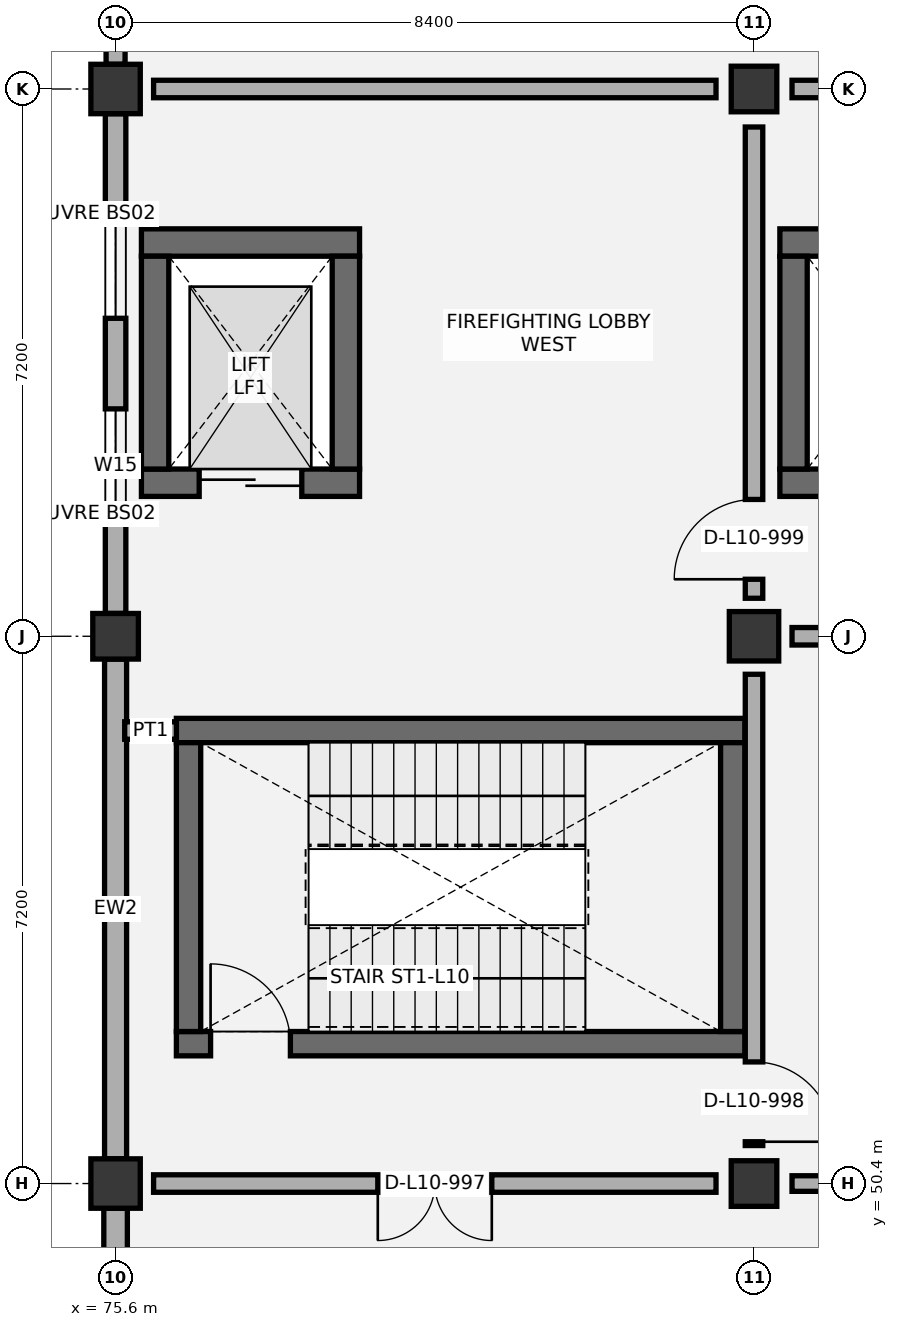
"""IFC4 building model, lengths in metres.
Left out: names, types, materials, properties, quantities, classifications, styles, units other than length and angle.
Written with IfcOpenShell. Run it as: python <this file> out.ifc"""

import sys

from ifc_helpers import new_model, si_unit, direction, frame, frame_2d, origin, origin_2d, place, context, subcontext, project, spatial, rectangle, extrude, element, fill, save


model = new_model("IFC4")
c1 = context("Model", 3, precision=1e-05, world=origin(), true_north=direction((0.0, 1.0)))
c2 = subcontext(c1, "Body", "Model", "MODEL_VIEW")
j1 = project(units=[si_unit("LENGTHUNIT", "METRE"), si_unit("PLANEANGLEUNIT", "RADIAN")], contexts=[c1])
p1 = place(None, origin())
s1 = spatial("IfcSite", under=j1, at=p1, CompositionType="ELEMENT")
p2 = place(p1, origin())
s2 = spatial("IfcBuilding", under=s1, at=p2, CompositionType="ELEMENT")
p3 = place(p2, frame((0.0, 0.0, 48.0)))
s3 = spatial("IfcBuildingStorey", under=s2, at=p3, CompositionType="ELEMENT", Elevation=48.0)
p4 = place(p3, frame((75.6, 50.4, 0.0), z_axis=(0.0, 0.0, 1.0), x_axis=(1.0, 0.0, 0.0)))
e1 = element("IfcColumn", 1, at=p4, inside=s3, PredefinedType="COLUMN", context=c2, shape_type="SweptSolid", body=[
    extrude(rectangle(XDim=0.65, YDim=0.65, at=origin_2d()), origin(), (0.0, 0.0, 1.0), 4.2),
])
p5 = place(p3, frame((75.6, 57.6, 0.0), z_axis=(0.0, 0.0, 1.0), x_axis=(1.0, 0.0, 0.0)))
e2 = element("IfcColumn", 2, at=p5, inside=s3, PredefinedType="COLUMN", context=c2, shape_type="SweptSolid", body=[
    extrude(rectangle(XDim=0.6, YDim=0.6, at=origin_2d()), origin(), (0.0, 0.0, 1.0), 4.2),
])
p6 = place(p3, frame((75.6, 64.8, 0.0), z_axis=(0.0, 0.0, 1.0), x_axis=(1.0, 0.0, 0.0)))
e3 = element("IfcColumn", 3, at=p6, inside=s3, PredefinedType="COLUMN", context=c2, shape_type="SweptSolid", body=[
    extrude(rectangle(XDim=0.65, YDim=0.65, at=origin_2d()), origin(), (0.0, 0.0, 1.0), 4.2),
])
p7 = place(p3, frame((84.0, 50.4, 0.0), z_axis=(0.0, 0.0, 1.0), x_axis=(1.0, 0.0, 0.0)))
e4 = element("IfcColumn", 4, at=p7, inside=s3, PredefinedType="COLUMN", context=c2, shape_type="SweptSolid", body=[
    extrude(rectangle(XDim=0.6, YDim=0.6, at=origin_2d()), origin(), (0.0, 0.0, 1.0), 4.2),
])
p8 = place(p3, frame((84.0, 57.6, 0.0), z_axis=(0.0, 0.0, 1.0), x_axis=(1.0, 0.0, 0.0)))
e5 = element("IfcColumn", 5, at=p8, inside=s3, PredefinedType="COLUMN", context=c2, shape_type="SweptSolid", body=[
    extrude(rectangle(XDim=0.65, YDim=0.65, at=origin_2d()), origin(), (0.0, 0.0, 1.0), 4.2),
])
p9 = place(p3, frame((84.0, 64.8, 0.0), z_axis=(0.0, 0.0, 1.0), x_axis=(1.0, 0.0, 0.0)))
e6 = element("IfcColumn", 6, at=p9, inside=s3, PredefinedType="COLUMN", context=c2, shape_type="SweptSolid", body=[
    extrude(rectangle(XDim=0.6, YDim=0.6, at=origin_2d()), origin(), (0.0, 0.0, 1.0), 4.2),
])
p10 = place(p3, frame((76.4, 52.24, 0.0), z_axis=(0.0, 0.0, 1.0), x_axis=(1.0, 0.0, 0.0)))
e7 = element("IfcWall", 7, at=p10, inside=s3, PredefinedType="SHEAR", context=c2, shape_type="SweptSolid", body=[
    extrude(rectangle(XDim=7.48, YDim=0.32, at=frame_2d((3.74, 0.0))), origin(), (0.0, 0.0, 1.0), 3.92),
])
p11 = place(p10, frame((0.45, 0.0, 0.0)))
e8 = element("IfcOpeningElement", 8, at=p11, cuts=e7, PredefinedType="OPENING", context=c2, shape_type="SweptSolid", body=[
    extrude(rectangle(XDim=1.05, YDim=2.15, at=frame_2d((0.525, 1.075))), frame((0.0, 0.17, 0.0), z_axis=(0.0, -1.0, 0.0), x_axis=(1.0, 0.0, 0.0)), (0.0, 0.0, 1.0), 0.34),
])
p12 = place(p3, frame((76.4, 56.36, 0.0), z_axis=(0.0, 0.0, 1.0), x_axis=(1.0, 0.0, 0.0)))
e9 = element("IfcWall", 9, at=p12, inside=s3, PredefinedType="SHEAR", context=c2, shape_type="SweptSolid", body=[
    extrude(rectangle(XDim=7.48, YDim=0.32, at=frame_2d((3.74, 0.0))), origin(), (0.0, 0.0, 1.0), 3.92),
])
for number, where, z_axis, x_axis in (
    (10, (76.56, 52.4, 0.0), (0.0, 0.0, 1.0), (0.0, 1.0, 0.0)),
    (11, (83.72, 52.4, 0.0), (0.0, 0.0, 1.0), (0.0, 1.0, 0.0)),
):
    element("IfcWall", number, at=place(p3, frame(where, z_axis=z_axis, x_axis=x_axis)), inside=s3, PredefinedType="SHEAR", context=c2, shape_type="SweptSolid", body=[
        extrude(rectangle(XDim=3.8, YDim=0.32, at=frame_2d((1.9, 0.0))), origin(), (0.0, 0.0, 1.0), 3.92),
    ])
p13 = place(p3, frame((75.94, 62.78, 0.0), z_axis=(0.0, 0.0, 1.0), x_axis=(1.0, 0.0, 0.0)))
e12 = element("IfcWall", 12, at=p13, inside=s3, PredefinedType="SHEAR", context=c2, shape_type="SweptSolid", body=[
    extrude(rectangle(XDim=2.87, YDim=0.36, at=frame_2d((1.435, 0.0))), origin(), (0.0, 0.0, 1.0), 3.92),
])
p14 = place(p3, frame((75.94, 59.62, 0.0), z_axis=(0.0, 0.0, 1.0), x_axis=(1.0, 0.0, 0.0)))
e13 = element("IfcWall", 13, at=p14, inside=s3, PredefinedType="SHEAR", context=c2, shape_type="SweptSolid", body=[
    extrude(rectangle(XDim=2.87, YDim=0.36, at=frame_2d((1.435, 0.0))), origin(), (0.0, 0.0, 1.0), 3.92),
])
p15 = place(p14, frame((0.76, 0.0, 0.0)))
e14 = element("IfcOpeningElement", 14, at=p15, cuts=e13, PredefinedType="OPENING", context=c2, shape_type="SweptSolid", body=[
    extrude(rectangle(XDim=1.35, YDim=2.2, at=frame_2d((0.675, 1.1))), frame((0.0, 0.19, 0.0), z_axis=(0.0, -1.0, 0.0), x_axis=(1.0, 0.0, 0.0)), (0.0, 0.0, 1.0), 0.38),
])
for number, where, z_axis, x_axis in (
    (15, (76.12, 59.8, 0.0), (0.0, 0.0, 1.0), (0.0, 1.0, 0.0)),
    (16, (78.63, 59.8, 0.0), (0.0, 0.0, 1.0), (0.0, 1.0, 0.0)),
):
    element("IfcWall", number, at=place(p3, frame(where, z_axis=z_axis, x_axis=x_axis)), inside=s3, PredefinedType="SHEAR", context=c2, shape_type="SweptSolid", body=[
        extrude(rectangle(XDim=2.8, YDim=0.36, at=frame_2d((1.4, 0.0))), origin(), (0.0, 0.0, 1.0), 3.92),
    ])
p16 = place(p3, frame((84.34, 62.78, 0.0), z_axis=(0.0, 0.0, 1.0), x_axis=(1.0, 0.0, 0.0)))
e17 = element("IfcWall", 17, at=p16, inside=s3, PredefinedType="SHEAR", context=c2, shape_type="SweptSolid", body=[
    extrude(rectangle(XDim=7.77, YDim=0.36, at=frame_2d((3.885, 0.0))), origin(), (0.0, 0.0, 1.0), 3.92),
])
p17 = place(p3, frame((84.34, 59.62, 0.0), z_axis=(0.0, 0.0, 1.0), x_axis=(1.0, 0.0, 0.0)))
e18 = element("IfcWall", 18, at=p17, inside=s3, PredefinedType="SHEAR", context=c2, shape_type="SweptSolid", body=[
    extrude(rectangle(XDim=2.66, YDim=0.36, at=frame_2d((1.33, 0.0))), origin(), (0.0, 0.0, 1.0), 3.92),
])
p18 = place(p17, frame((0.78, 0.0, 0.0)))
e19 = element("IfcOpeningElement", 19, at=p18, cuts=e18, PredefinedType="OPENING", context=c2, shape_type="SweptSolid", body=[
    extrude(rectangle(XDim=1.1, YDim=2.15, at=frame_2d((0.55, 1.075))), frame((0.0, 0.19, 0.0), z_axis=(0.0, -1.0, 0.0), x_axis=(1.0, 0.0, 0.0)), (0.0, 0.0, 1.0), 0.38),
])
p19 = place(p3, frame((84.52, 59.8, 0.0), z_axis=(0.0, 0.0, 1.0), x_axis=(0.0, 1.0, 0.0)))
e20 = element("IfcWall", 20, at=p19, inside=s3, PredefinedType="SHEAR", context=c2, shape_type="SweptSolid", body=[
    extrude(rectangle(XDim=2.8, YDim=0.36, at=frame_2d((1.4, 0.0))), origin(), (0.0, 0.0, 1.0), 3.92),
])
p20 = place(p3, frame((75.6, 43.5, 0.0), z_axis=(0.0, 0.0, 1.0), x_axis=(0.0, 1.0, 0.0)))
e21 = element("IfcWall", 21, at=p20, inside=s3, PredefinedType="SOLIDWALL", context=c2, shape_type="SweptSolid", body=[
    extrude(rectangle(XDim=6.575, YDim=0.31, at=frame_2d((3.288, 0.0))), origin(), (0.0, 0.0, 1.0), 3.365),
])
p21 = place(p20, frame((1.938, 0.0, 0.95)))
e22 = element("IfcOpeningElement", 22, at=p21, cuts=e21, PredefinedType="OPENING", context=c2, shape_type="SweptSolid", body=[
    extrude(rectangle(XDim=2.7, YDim=1.65, at=frame_2d((1.35, 0.825))), frame((0.0, 0.165, 0.0), z_axis=(0.0, -1.0, 0.0), x_axis=(1.0, 0.0, 0.0)), (0.0, 0.0, 1.0), 0.33),
])
p22 = place(p3, frame((75.6, 50.725, 0.0), z_axis=(0.0, 0.0, 1.0), x_axis=(0.0, 1.0, 0.0)))
e23 = element("IfcWall", 23, at=p22, inside=s3, PredefinedType="SOLIDWALL", context=c2, shape_type="SweptSolid", body=[
    extrude(rectangle(XDim=6.575, YDim=0.29, at=frame_2d((3.288, 0.0))), origin(), (0.0, 0.0, 1.0), 3.365),
])
p23 = place(p3, frame((75.6, 57.9, 0.0), z_axis=(0.0, 0.0, 1.0), x_axis=(0.0, 1.0, 0.0)))
e24 = element("IfcWall", 24, at=p23, inside=s3, PredefinedType="SOLIDWALL", context=c2, shape_type="SweptSolid", body=[
    extrude(rectangle(XDim=6.575, YDim=0.27, at=frame_2d((3.288, 0.0))), origin(), (0.0, 0.0, 1.0), 3.365),
])
p24 = place(p23, frame((1.192, 0.0, 0.95)))
e25 = element("IfcOpeningElement", 25, at=p24, cuts=e24, PredefinedType="OPENING", context=c2, shape_type="SweptSolid", body=[
    extrude(rectangle(XDim=1.5, YDim=1.5, at=frame_2d((0.75, 0.75))), frame((0.0, 0.145, 0.0), z_axis=(0.0, -1.0, 0.0), x_axis=(1.0, 0.0, 0.0)), (0.0, 0.0, 1.0), 0.29),
])
p25 = place(p23, frame((3.883, 0.0, 0.95)))
e26 = element("IfcOpeningElement", 26, at=p25, cuts=e24, PredefinedType="OPENING", context=c2, shape_type="SweptSolid", body=[
    extrude(rectangle(XDim=1.5, YDim=1.5, at=frame_2d((0.75, 0.75))), frame((0.0, 0.145, 0.0), z_axis=(0.0, -1.0, 0.0), x_axis=(1.0, 0.0, 0.0)), (0.0, 0.0, 1.0), 0.29),
])
p26 = place(p3, frame((75.6, 65.125, 0.0), z_axis=(0.0, 0.0, 1.0), x_axis=(0.0, 1.0, 0.0)))
e27 = element("IfcWall", 27, at=p26, inside=s3, PredefinedType="SOLIDWALL", context=c2, shape_type="SweptSolid", body=[
    extrude(rectangle(XDim=6.575, YDim=0.25, at=frame_2d((3.288, 0.0))), origin(), (0.0, 0.0, 1.0), 3.365),
])
p27 = place(p26, frame((2.087, 0.0, 0.95)))
e28 = element("IfcOpeningElement", 28, at=p27, cuts=e27, PredefinedType="OPENING", context=c2, shape_type="SweptSolid", body=[
    extrude(rectangle(XDim=2.4, YDim=1.5, at=frame_2d((1.2, 0.75))), frame((0.0, 0.135, 0.0), z_axis=(0.0, -1.0, 0.0), x_axis=(1.0, 0.0, 0.0)), (0.0, 0.0, 1.0), 0.27),
])
p28 = place(p3, frame((76.1, 50.4, 0.0), z_axis=(0.0, 0.0, 1.0), x_axis=(1.0, 0.0, 0.0)))
e29 = element("IfcWall", 29, at=p28, inside=s3, PredefinedType="PARTITIONING", context=c2, shape_type="SweptSolid", body=[
    extrude(rectangle(XDim=7.4, YDim=0.23, at=frame_2d((3.7, 0.0))), origin(), (0.0, 0.0, 1.0), 3.365),
])
p29 = place(p28, frame((2.95, 0.0, 0.0)))
e30 = element("IfcOpeningElement", 30, at=p29, cuts=e29, PredefinedType="OPENING", context=c2, shape_type="SweptSolid", body=[
    extrude(rectangle(XDim=1.5, YDim=2.15, at=frame_2d((0.75, 1.075))), frame((0.0, 0.125, 0.0), z_axis=(0.0, -1.0, 0.0), x_axis=(1.0, 0.0, 0.0)), (0.0, 0.0, 1.0), 0.25),
])
p30 = place(p3, frame((84.0, 50.9, 0.0), z_axis=(0.0, 0.0, 1.0), x_axis=(0.0, 1.0, 0.0)))
e31 = element("IfcWall", 31, at=p30, inside=s3, PredefinedType="PARTITIONING", context=c2, shape_type="SweptSolid", body=[
    extrude(rectangle(XDim=6.2, YDim=0.23, at=frame_2d((3.1, 0.0))), origin(), (0.0, 0.0, 1.0), 3.415),
])
p31 = place(p30, frame((0.05, 0.0, 0.0)))
e32 = element("IfcOpeningElement", 32, at=p31, cuts=e31, PredefinedType="OPENING", context=c2, shape_type="SweptSolid", body=[
    extrude(rectangle(XDim=1.05, YDim=2.15, at=frame_2d((0.525, 1.075))), frame((0.0, 0.125, 0.0), z_axis=(0.0, -1.0, 0.0), x_axis=(1.0, 0.0, 0.0)), (0.0, 0.0, 1.0), 0.25),
])
p32 = place(p3, frame((75.72, 56.36, 0.0), z_axis=(0.0, 0.0, 1.0), x_axis=(1.0, 0.0, 0.0)))
e33 = element("IfcWall", 33, at=p32, inside=s3, PredefinedType="PARTITIONING", context=c2, shape_type="SweptSolid", body=[
    extrude(rectangle(XDim=0.68, YDim=0.23, at=frame_2d((0.34, 0.0))), origin(), (0.0, 0.0, 1.0), 3.92),
])
p33 = place(p3, frame((84.0, 58.1, 0.0), z_axis=(0.0, 0.0, 1.0), x_axis=(0.0, 1.0, 0.0)))
e34 = element("IfcWall", 34, at=p33, inside=s3, PredefinedType="PARTITIONING", context=c2, shape_type="SweptSolid", body=[
    extrude(rectangle(XDim=6.2, YDim=0.23, at=frame_2d((3.1, 0.0))), origin(), (0.0, 0.0, 1.0), 3.415),
])
p34 = place(p33, frame((0.25, 0.0, 0.0)))
e35 = element("IfcOpeningElement", 35, at=p34, cuts=e34, PredefinedType="OPENING", context=c2, shape_type="SweptSolid", body=[
    extrude(rectangle(XDim=1.05, YDim=2.15, at=frame_2d((0.525, 1.075))), frame((0.0, 0.125, 0.0), z_axis=(0.0, -1.0, 0.0), x_axis=(1.0, 0.0, 0.0)), (0.0, 0.0, 1.0), 0.25),
])
p35 = place(p3, frame((76.1, 64.8, 0.0), z_axis=(0.0, 0.0, 1.0), x_axis=(1.0, 0.0, 0.0)))
e36 = element("IfcWall", 36, at=p35, inside=s3, PredefinedType="PARTITIONING", context=c2, shape_type="SweptSolid", body=[
    extrude(rectangle(XDim=7.4, YDim=0.23, at=frame_2d((3.7, 0.0))), origin(), (0.0, 0.0, 1.0), 3.365),
])
p36 = place(p3, frame((84.5, 50.4, 0.0), z_axis=(0.0, 0.0, 1.0), x_axis=(1.0, 0.0, 0.0)))
e37 = element("IfcWall", 37, at=p36, inside=s3, PredefinedType="PARTITIONING", context=c2, shape_type="SweptSolid", body=[
    extrude(rectangle(XDim=7.4, YDim=0.205, at=frame_2d((3.7, 0.0))), origin(), (0.0, 0.0, 1.0), 3.365),
])
p37 = place(p36, frame((3.05, 0.0, 0.0)))
e38 = element("IfcOpeningElement", 38, at=p37, cuts=e37, PredefinedType="OPENING", context=c2, shape_type="SweptSolid", body=[
    extrude(rectangle(XDim=1.3, YDim=2.15, at=frame_2d((0.65, 1.075))), frame((0.0, 0.113, 0.0), z_axis=(0.0, -1.0, 0.0), x_axis=(1.0, 0.0, 0.0)), (0.0, 0.0, 1.0), 0.225),
])
p38 = place(p3, frame((84.5, 57.6, 0.0), z_axis=(0.0, 0.0, 1.0), x_axis=(1.0, 0.0, 0.0)))
e39 = element("IfcWall", 39, at=p38, inside=s3, PredefinedType="PARTITIONING", context=c2, shape_type="SweptSolid", body=[
    extrude(rectangle(XDim=7.4, YDim=0.23, at=frame_2d((3.7, 0.0))), origin(), (0.0, 0.0, 1.0), 3.365),
])
p39 = place(p38, frame((2.95, 0.0, 0.0)))
e40 = element("IfcOpeningElement", 40, at=p39, cuts=e39, PredefinedType="OPENING", context=c2, shape_type="SweptSolid", body=[
    extrude(rectangle(XDim=1.5, YDim=2.15, at=frame_2d((0.75, 1.075))), frame((0.0, 0.125, 0.0), z_axis=(0.0, -1.0, 0.0), x_axis=(1.0, 0.0, 0.0)), (0.0, 0.0, 1.0), 0.25),
])
p40 = place(p3, frame((84.5, 64.8, 0.0), z_axis=(0.0, 0.0, 1.0), x_axis=(1.0, 0.0, 0.0)))
e41 = element("IfcWall", 41, at=p40, inside=s3, PredefinedType="PARTITIONING", context=c2, shape_type="SweptSolid", body=[
    extrude(rectangle(XDim=7.4, YDim=0.23, at=frame_2d((3.7, 0.0))), origin(), (0.0, 0.0, 1.0), 3.365),
])
p41 = place(p24, origin())
e42 = element("IfcWindow", 42, at=p41, inside=s3, PartitioningType="SINGLE_PANEL", PredefinedType="WINDOW", context=c2, shape_type="SweptSolid", body=[
    extrude(rectangle(XDim=1.5, YDim=1.5, at=frame_2d((0.75, 0.75))), frame((0.0, 0.03, 0.0), z_axis=(0.0, -1.0, 0.0), x_axis=(1.0, 0.0, 0.0)), (0.0, 0.0, 1.0), 0.06),
])
fill(e25, e42)
p42 = place(p25, origin())
e43 = element("IfcWindow", 43, at=p42, inside=s3, PartitioningType="SINGLE_PANEL", PredefinedType="WINDOW", context=c2, shape_type="SweptSolid", body=[
    extrude(rectangle(XDim=1.5, YDim=1.5, at=frame_2d((0.75, 0.75))), frame((0.0, 0.03, 0.0), z_axis=(0.0, -1.0, 0.0), x_axis=(1.0, 0.0, 0.0)), (0.0, 0.0, 1.0), 0.06),
])
fill(e26, e43)
p43 = place(p11, origin())
e44 = element("IfcDoor", 44, at=p43, inside=s3, OperationType="SINGLE_SWING_LEFT", PredefinedType="DOOR", context=c2, shape_type="SweptSolid", body=[
    extrude(rectangle(XDim=1.05, YDim=2.15, at=frame_2d((0.525, 1.075))), frame((0.0, 0.025, 0.0), z_axis=(0.0, -1.0, 0.0), x_axis=(1.0, 0.0, 0.0)), (0.0, 0.0, 1.0), 0.05),
])
fill(e8, e44)
p44 = place(p15, origin())
e45 = element("IfcDoor", 45, at=p44, inside=s3, OperationType="DOUBLE_DOOR_SLIDING", PredefinedType="DOOR", context=c2, shape_type="SweptSolid", body=[
    extrude(rectangle(XDim=1.35, YDim=2.2, at=frame_2d((0.675, 1.1))), frame((0.0, 0.025, 0.0), z_axis=(0.0, -1.0, 0.0), x_axis=(1.0, 0.0, 0.0)), (0.0, 0.0, 1.0), 0.05),
])
fill(e14, e45)
p45 = place(p29, frame((1.5, 0.0, 0.0), z_axis=(0.0, 0.0, 1.0), x_axis=(-1.0, 0.0, 0.0)))
e46 = element("IfcDoor", 46, at=p45, inside=s3, OperationType="DOUBLE_DOOR_SINGLE_SWING", PredefinedType="DOOR", context=c2, shape_type="SweptSolid", body=[
    extrude(rectangle(XDim=1.5, YDim=2.15, at=frame_2d((0.75, 1.075))), frame((0.0, 0.025, 0.0), z_axis=(0.0, -1.0, 0.0), x_axis=(1.0, 0.0, 0.0)), (0.0, 0.0, 1.0), 0.05),
])
fill(e30, e46)
p46 = place(p31, frame((1.05, 0.0, 0.0), z_axis=(0.0, 0.0, 1.0), x_axis=(-1.0, 0.0, 0.0)))
e47 = element("IfcDoor", 47, at=p46, inside=s3, OperationType="SINGLE_SWING_RIGHT", PredefinedType="DOOR", context=c2, shape_type="SweptSolid", body=[
    extrude(rectangle(XDim=1.05, YDim=2.15, at=frame_2d((0.525, 1.075))), frame((0.0, 0.025, 0.0), z_axis=(0.0, -1.0, 0.0), x_axis=(1.0, 0.0, 0.0)), (0.0, 0.0, 1.0), 0.05),
])
fill(e32, e47)
p47 = place(p34, origin())
e48 = element("IfcDoor", 48, at=p47, inside=s3, OperationType="SINGLE_SWING_LEFT", PredefinedType="DOOR", context=c2, shape_type="SweptSolid", body=[
    extrude(rectangle(XDim=1.05, YDim=2.15, at=frame_2d((0.525, 1.075))), frame((0.0, 0.025, 0.0), z_axis=(0.0, -1.0, 0.0), x_axis=(1.0, 0.0, 0.0)), (0.0, 0.0, 1.0), 0.05),
])
fill(e35, e48)
save(model, sys.argv[1])
